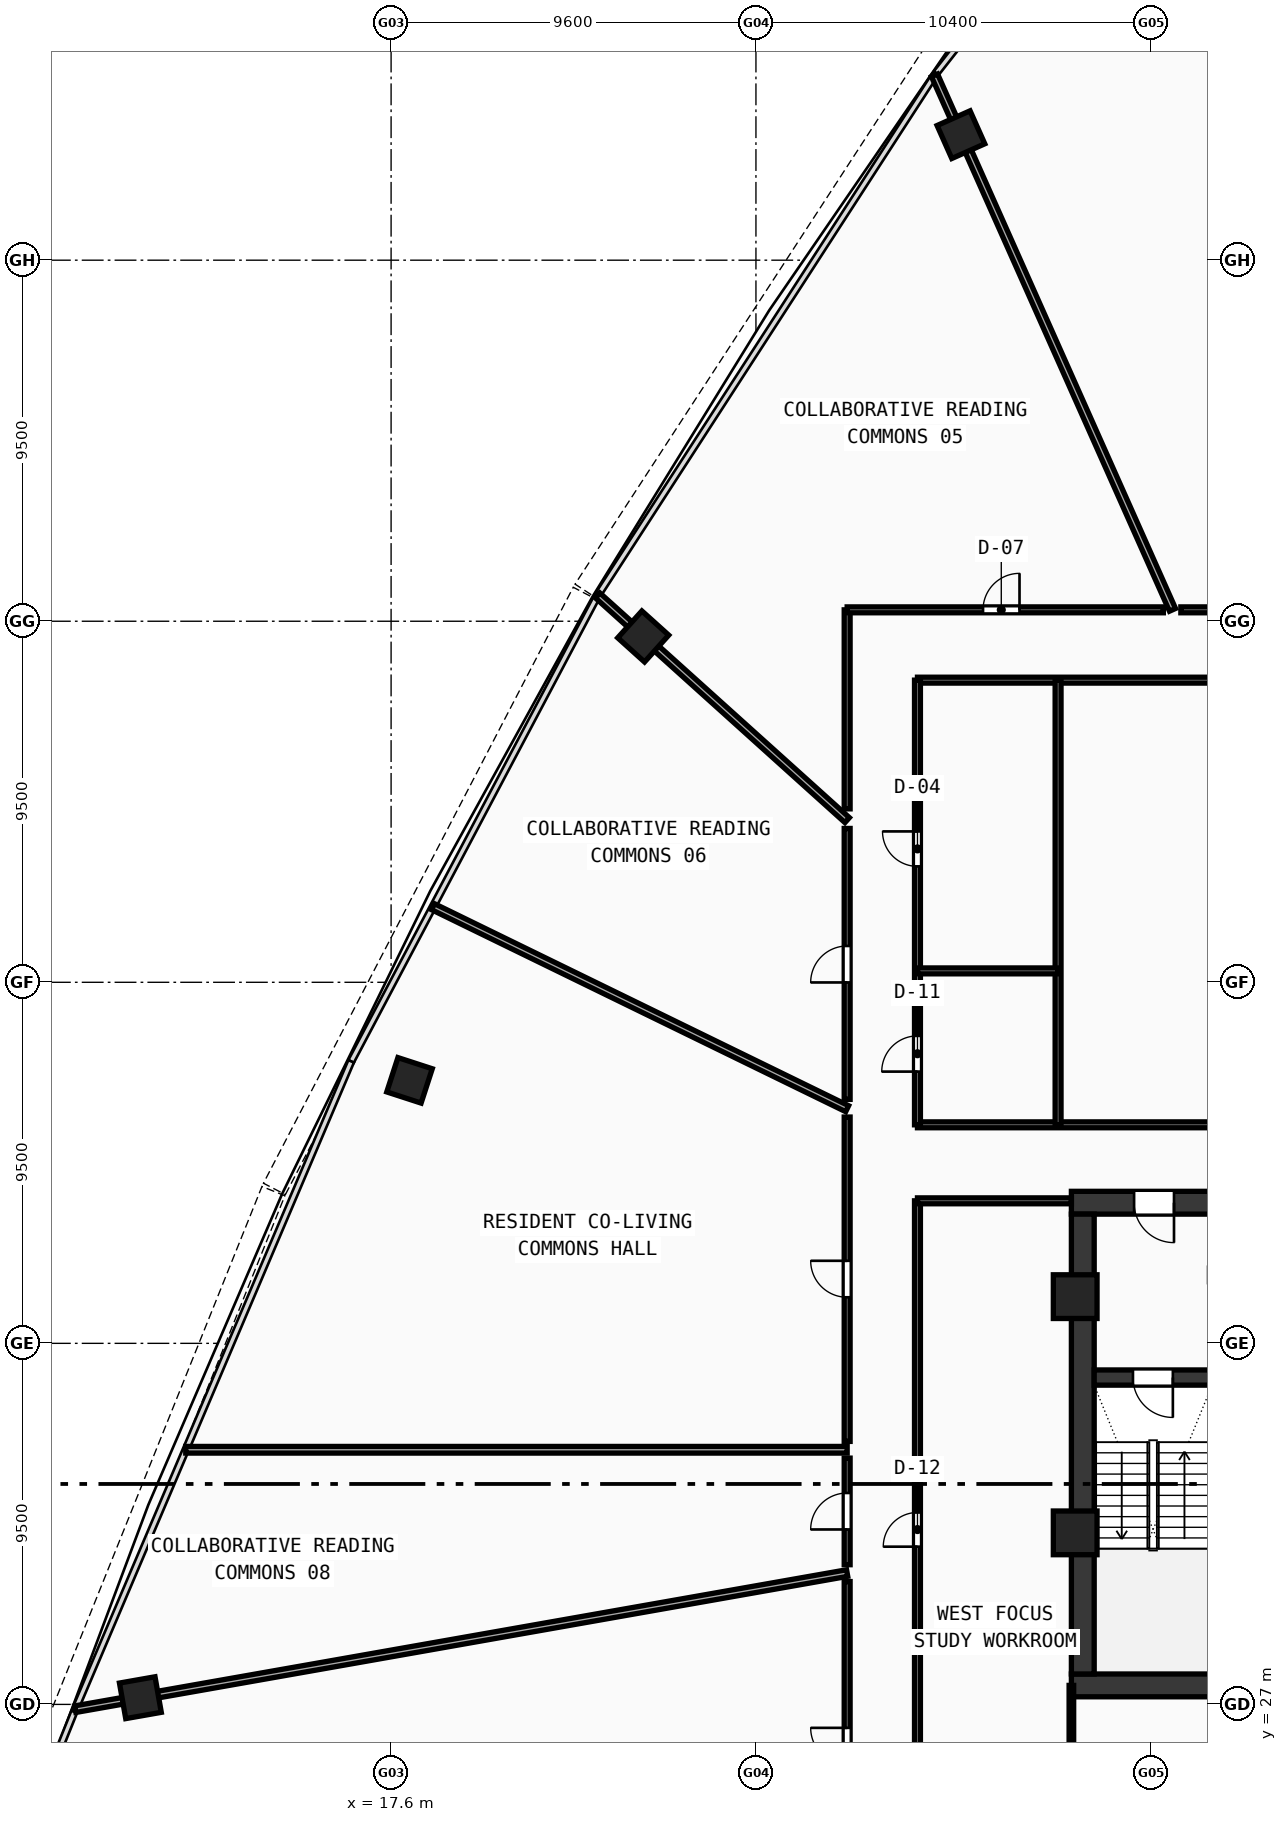
"""IFC4 building model, lengths in metres.
Left out: names, types, materials, properties, quantities, classifications, styles, units other than length and angle.
Written with IfcOpenShell. Run it as: python <this file> out.ifc"""

import sys

from ifc_helpers import new_model, si_unit, direction, frame, frame_2d, origin, origin_with_axes, origin_2d, place, context, subcontext, project, spatial, rectangle, hollow_rectangle, extrude, source, transform, mapped, element, fill, save


model = new_model("IFC4")
c1 = context("Model", 3, precision=1e-05, world=origin(), true_north=direction((0.0, 1.0)))
c2 = subcontext(c1, "Body", "Model", "MODEL_VIEW")
j1 = project(units=[si_unit("LENGTHUNIT", "METRE"), si_unit("PLANEANGLEUNIT", "RADIAN")], contexts=[c1])
p1 = place(None, origin())
s1 = spatial("IfcSite", under=j1, at=p1, CompositionType="ELEMENT")
p2 = place(p1, origin())
s2 = spatial("IfcBuilding", under=s1, at=p2, CompositionType="ELEMENT")
p3 = place(p2, frame((0.0, 0.0, 144.55)))
s3 = spatial("IfcBuildingStorey", under=s2, at=p3, CompositionType="ELEMENT", Elevation=144.55)
p4 = place(p3, frame((35.5, 27.5, 0.0), z_axis=(0.0, 0.0, 1.0), x_axis=(1.0, 0.0, 0.0)))
e1 = element("IfcWall", 1, at=p4, inside=s3, PredefinedType="SHEAR", context=c2, shape_type="SweptSolid", body=[
    extrude(rectangle(XDim=25.0, YDim=0.6, at=frame_2d((12.5, 0.0))), origin(), (0.0, 0.0, 1.0), 3.42),
])
p5 = place(p3, frame((35.5, 40.2, 0.0), z_axis=(0.0, 0.0, 1.0), x_axis=(1.0, 0.0, 0.0)))
e2 = element("IfcWall", 2, at=p5, inside=s3, PredefinedType="SHEAR", context=c2, shape_type="SweptSolid", body=[
    extrude(rectangle(XDim=11.3, YDim=0.6, at=frame_2d((5.65, 0.0))), origin(), (0.0, 0.0, 1.0), 3.42),
])
p6 = place(p5, frame((1.65, 0.0, 0.0)))
e3 = element("IfcOpeningElement", 3, at=p6, cuts=e2, PredefinedType="OPENING", context=c2, shape_type="SweptSolid", body=[
    extrude(rectangle(XDim=1.05, YDim=2.1, at=frame_2d((0.525, 1.05))), frame((0.0, 0.31, 0.0), z_axis=(0.0, -1.0, 0.0), x_axis=(1.0, 0.0, 0.0)), (0.0, 0.0, 1.0), 0.62),
])
p7 = place(p3, frame((35.8, 27.8, 0.0), z_axis=(0.0, 0.0, 1.0), x_axis=(0.0, 1.0, 0.0)))
e4 = element("IfcWall", 4, at=p7, inside=s3, PredefinedType="SHEAR", context=c2, shape_type="SweptSolid", body=[
    extrude(rectangle(XDim=12.1, YDim=0.6, at=frame_2d((6.05, 0.0))), origin(), (0.0, 0.0, 1.0), 3.42),
])
p8 = place(p3, frame((36.1, 35.6, 0.0), z_axis=(0.0, 0.0, 1.0), x_axis=(1.0, 0.0, 0.0)))
e5 = element("IfcWall", 5, at=p8, inside=s3, PredefinedType="SHEAR", context=c2, shape_type="SweptSolid", body=[
    extrude(rectangle(XDim=3.1, YDim=0.4, at=frame_2d((1.55, 0.0))), origin(), (0.0, 0.0, 1.0), 3.42),
])
p9 = place(p8, frame((1.02, 0.0, 0.0)))
e6 = element("IfcOpeningElement", 6, at=p9, cuts=e5, PredefinedType="OPENING", context=c2, shape_type="SweptSolid", body=[
    extrude(rectangle(XDim=1.05, YDim=2.1, at=frame_2d((0.525, 1.05))), frame((0.0, 0.21, 0.0), z_axis=(0.0, -1.0, 0.0), x_axis=(1.0, 0.0, 0.0)), (0.0, 0.0, 1.0), 0.42),
])
m1 = source(origin(), c2, "Body", "SweptSolid", [
    extrude(hollow_rectangle(XDim=1.15, YDim=1.15, WallThickness=0.048, at=origin_2d()), origin(), (0.0, 0.0, 1.0), 3.68),
])
for number, where, z_axis, x_axis in (
    (7, (35.6, 37.729, -0.26), (0.0, 0.0, 1.0), (1.0, 0.0, 0.0)),
    (8, (35.6, 31.513, -0.26), (0.0, 0.0, 1.0), (1.0, 0.0, 0.0)),
):
    element("IfcColumn", number, at=place(p3, frame(where, z_axis=z_axis, x_axis=x_axis)), inside=s3, PredefinedType="COLUMN", context=c2, shape_type="MappedRepresentation", body=[
        mapped(m1, transform((0.0, 0.0, 0.0), scale=1.0)),
    ])
m2 = source(origin(), c2, "Body", "SweptSolid", [
    extrude(hollow_rectangle(XDim=0.95, YDim=0.95, WallThickness=0.04, at=origin_2d()), origin(), (0.0, 0.0, 1.0), 3.68),
])
for number, where, z_axis, x_axis in (
    (9, (32.594, 68.303, -0.26), (0.0, 0.0, 1.0), (-0.914, -0.407, 0.0)),
    (10, (24.234, 55.099, -0.26), (0.0, 0.0, 1.0), (-0.669, -0.743, 0.0)),
    (11, (18.085, 43.42, -0.26), (0.0, 0.0, 1.0), (-0.309, -0.951, 0.0)),
    (12, (11.003, 27.177, -0.26), (0.0, 0.0, 1.0), (0.174, -0.985, 0.0)),
):
    element("IfcColumn", number, at=place(p3, frame(where, z_axis=z_axis, x_axis=x_axis)), inside=s3, PredefinedType="COLUMN", context=c2, shape_type="MappedRepresentation", body=[
        mapped(m2, transform((0.0, 0.0, 0.0), scale=1.0)),
    ])
p10 = place(p3, frame((31.45, 42.25, 0.0), z_axis=(0.0, 0.0, 1.0), x_axis=(1.0, 0.0, 0.0)))
e13 = element("IfcWall", 13, at=p10, inside=s3, PredefinedType="PARTITIONING", context=c2, shape_type="SweptSolid", body=[
    extrude(rectangle(XDim=33.1, YDim=0.155, at=frame_2d((16.55, 0.0))), origin(), (0.0, 0.0, 1.0), 2.77),
])
p11 = place(p3, frame((31.45, 53.95, 0.0), z_axis=(0.0, 0.0, 1.0), x_axis=(1.0, 0.0, 0.0)))
e14 = element("IfcWall", 14, at=p11, inside=s3, PredefinedType="PARTITIONING", context=c2, shape_type="SweptSolid", body=[
    extrude(rectangle(XDim=33.1, YDim=0.155, at=frame_2d((16.55, 0.0))), origin(), (0.0, 0.0, 1.0), 2.77),
])
p12 = place(p11, frame((8.0, 0.0, 0.0)))
e15 = element("IfcOpeningElement", 15, at=p12, cuts=e14, PredefinedType="OPENING", context=c2, shape_type="SweptSolid", body=[
    extrude(rectangle(XDim=0.92, YDim=2.1, at=frame_2d((0.46, 1.05))), frame((0.0, 0.087, 0.0), z_axis=(0.0, -1.0, 0.0), x_axis=(1.0, 0.0, 0.0)), (0.0, 0.0, 1.0), 0.175),
])
p13 = place(p11, frame((25.05, 0.0, 0.0)))
e16 = element("IfcOpeningElement", 16, at=p13, cuts=e14, PredefinedType="OPENING", context=c2, shape_type="SweptSolid", body=[
    extrude(rectangle(XDim=0.92, YDim=2.1, at=frame_2d((0.46, 1.05))), frame((0.0, 0.087, 0.0), z_axis=(0.0, -1.0, 0.0), x_axis=(1.0, 0.0, 0.0)), (0.0, 0.0, 1.0), 0.175),
])
p14 = place(p3, frame((31.45, 42.25, 0.0), z_axis=(0.0, 0.0, 1.0), x_axis=(0.0, 1.0, 0.0)))
e17 = element("IfcWall", 17, at=p14, inside=s3, PredefinedType="PARTITIONING", context=c2, shape_type="SweptSolid", body=[
    extrude(rectangle(XDim=11.7, YDim=0.155, at=frame_2d((5.85, 0.0))), origin(), (0.0, 0.0, 1.0), 2.77),
])
p15 = place(p14, frame((1.4, 0.0, 0.0)))
e18 = element("IfcOpeningElement", 18, at=p15, cuts=e17, PredefinedType="OPENING", context=c2, shape_type="SweptSolid", body=[
    extrude(rectangle(XDim=0.94, YDim=2.1, at=frame_2d((0.47, 1.05))), frame((0.0, 0.087, 0.0), z_axis=(0.0, -1.0, 0.0), x_axis=(1.0, 0.0, 0.0)), (0.0, 0.0, 1.0), 0.175),
])
p16 = place(p14, frame((6.8, 0.0, 0.0)))
e19 = element("IfcOpeningElement", 19, at=p16, cuts=e17, PredefinedType="OPENING", context=c2, shape_type="SweptSolid", body=[
    extrude(rectangle(XDim=0.92, YDim=2.1, at=frame_2d((0.46, 1.05))), frame((0.0, 0.087, 0.0), z_axis=(0.0, -1.0, 0.0), x_axis=(1.0, 0.0, 0.0)), (0.0, 0.0, 1.0), 0.175),
])
p17 = place(p3, frame((35.15, 42.25, 0.0), z_axis=(0.0, 0.0, 1.0), x_axis=(0.0, 1.0, 0.0)))
e20 = element("IfcWall", 20, at=p17, inside=s3, PredefinedType="PARTITIONING", context=c2, shape_type="SweptSolid", body=[
    extrude(rectangle(XDim=11.7, YDim=0.155, at=frame_2d((5.85, 0.0))), origin(), (0.0, 0.0, 1.0), 2.77),
])
p18 = place(p3, frame((31.45, 46.3, 0.0), z_axis=(0.0, 0.0, 1.0), x_axis=(1.0, 0.0, 0.0)))
e21 = element("IfcWall", 21, at=p18, inside=s3, PredefinedType="PARTITIONING", context=c2, shape_type="SweptSolid", body=[
    extrude(rectangle(XDim=3.7, YDim=0.155, at=frame_2d((1.85, 0.0))), origin(), (0.0, 0.0, 1.0), 2.77),
])
p19 = place(p3, frame((31.45, 23.65, 0.0), z_axis=(0.0, 0.0, 1.0), x_axis=(0.0, 1.0, 0.0)))
e22 = element("IfcWall", 22, at=p19, inside=s3, PredefinedType="PARTITIONING", context=c2, shape_type="SweptSolid", body=[
    extrude(rectangle(XDim=16.6, YDim=0.155, at=frame_2d((8.3, 0.0))), origin(), (0.0, 0.0, 1.0), 2.77),
])
p20 = place(p19, frame((7.5, 0.0, 0.0)))
e23 = element("IfcOpeningElement", 23, at=p20, cuts=e22, PredefinedType="OPENING", context=c2, shape_type="SweptSolid", body=[
    extrude(rectangle(XDim=0.9, YDim=2.08, at=frame_2d((0.45, 1.04))), frame((0.0, 0.087, 0.0), z_axis=(0.0, -1.0, 0.0), x_axis=(1.0, 0.0, 0.0)), (0.0, 0.0, 1.0), 0.175),
])
p21 = place(p3, frame((31.45, 40.25, 0.0), z_axis=(0.0, 0.0, 1.0), x_axis=(1.0, 0.0, 0.0)))
e24 = element("IfcWall", 24, at=p21, inside=s3, PredefinedType="PARTITIONING", context=c2, shape_type="SweptSolid", body=[
    extrude(rectangle(XDim=4.05, YDim=0.155, at=frame_2d((2.025, 0.0))), origin(), (0.0, 0.0, 1.0), 3.42),
])
p22 = place(p3, frame((35.5, 23.65, 0.0), z_axis=(0.0, 0.0, 1.0), x_axis=(0.0, 1.0, 0.0)))
e25 = element("IfcWall", 25, at=p22, inside=s3, PredefinedType="PARTITIONING", context=c2, shape_type="SweptSolid", body=[
    extrude(rectangle(XDim=3.85, YDim=0.12, at=frame_2d((1.925, 0.0))), origin(), (0.0, 0.0, 1.0), 3.02),
])
p23 = place(p3, frame((38.16, 55.8, 0.0), z_axis=(0.0, 0.0, 1.0), x_axis=(-0.406735812773, 0.913545827317, 0.0)))
e26 = element("IfcWall", 26, at=p23, inside=s3, PredefinedType="PARTITIONING", context=c2, shape_type="SweptSolid", body=[
    extrude(rectangle(XDim=15.394, YDim=0.175, at=frame_2d((7.697, 0.0))), origin(), (0.0, 0.0, 1.0), 2.77),
])
p24 = place(p3, frame((29.6, 50.267, 0.0), z_axis=(0.0, 0.0, 1.0), x_axis=(-0.743144335498, 0.669131150535, 0.0)))
e27 = element("IfcWall", 27, at=p24, inside=s3, PredefinedType="PARTITIONING", context=c2, shape_type="SweptSolid", body=[
    extrude(rectangle(XDim=8.834, YDim=0.175, at=frame_2d((4.417, 0.0))), origin(), (0.0, 0.0, 1.0), 2.77),
])
p25 = place(p3, frame((29.6, 42.674, 0.0), z_axis=(0.0, 0.0, 1.0), x_axis=(-0.898797277455, 0.438364521875, 0.0)))
e28 = element("IfcWall", 28, at=p25, inside=s3, PredefinedType="PARTITIONING", context=c2, shape_type="SweptSolid", body=[
    extrude(rectangle(XDim=12.125, YDim=0.175, at=frame_2d((6.062, 0.0))), origin(), (0.0, 0.0, 1.0), 2.77),
])
p26 = place(p3, frame((29.6, 33.7, 0.0), z_axis=(0.0, 0.0, 1.0), x_axis=(-1.0, 0.0, 0.0)))
e29 = element("IfcWall", 29, at=p26, inside=s3, PredefinedType="PARTITIONING", context=c2, shape_type="SweptSolid", body=[
    extrude(rectangle(XDim=17.403, YDim=0.175, at=frame_2d((8.702, 0.0))), origin(), (0.0, 0.0, 1.0), 2.77),
])
p27 = place(p3, frame((29.6, 30.456, 0.0), z_axis=(0.0, 0.0, 1.0), x_axis=(-0.984807623882, -0.173648909998, 0.0)))
e30 = element("IfcWall", 30, at=p27, inside=s3, PredefinedType="PARTITIONING", context=c2, shape_type="SweptSolid", body=[
    extrude(rectangle(XDim=20.622, YDim=0.175, at=frame_2d((10.311, 0.0))), origin(), (0.0, 0.0, 1.0), 2.77),
])
p28 = place(p3, frame((29.6, 21.8, 0.0), z_axis=(0.0, 0.0, 1.0), x_axis=(0.0, 1.0, 0.0)))
e31 = element("IfcWall", 31, at=p28, inside=s3, PredefinedType="PARTITIONING", context=c2, shape_type="SweptSolid", body=[
    extrude(rectangle(XDim=8.432, YDim=0.155, at=frame_2d((4.216, 0.0))), origin(), (0.0, 0.0, 1.0), 3.02),
])
p29 = place(p28, frame((3.623, 0.0, 0.0)))
e32 = element("IfcOpeningElement", 32, at=p29, cuts=e31, PredefinedType="OPENING", context=c2, shape_type="SweptSolid", body=[
    extrude(rectangle(XDim=0.96, YDim=2.12, at=frame_2d((0.48, 1.06))), frame((0.0, 0.087, 0.0), z_axis=(0.0, -1.0, 0.0), x_axis=(1.0, 0.0, 0.0)), (0.0, 0.0, 1.0), 0.175),
])
p30 = place(p3, frame((29.6, 30.675, 0.0), z_axis=(0.0, 0.0, 1.0), x_axis=(0.0, 1.0, 0.0)))
e33 = element("IfcWall", 33, at=p30, inside=s3, PredefinedType="PARTITIONING", context=c2, shape_type="SweptSolid", body=[
    extrude(rectangle(XDim=2.805, YDim=0.155, at=frame_2d((1.402, 0.0))), origin(), (0.0, 0.0, 1.0), 3.42),
])
p31 = place(p30, frame((0.927, 0.0, 0.0)))
e34 = element("IfcOpeningElement", 34, at=p31, cuts=e33, PredefinedType="OPENING", context=c2, shape_type="SweptSolid", body=[
    extrude(rectangle(XDim=0.96, YDim=2.12, at=frame_2d((0.48, 1.06))), frame((0.0, 0.087, 0.0), z_axis=(0.0, -1.0, 0.0), x_axis=(1.0, 0.0, 0.0)), (0.0, 0.0, 1.0), 0.175),
])
p32 = place(p3, frame((29.6, 33.92, 0.0), z_axis=(0.0, 0.0, 1.0), x_axis=(0.0, 1.0, 0.0)))
e35 = element("IfcWall", 35, at=p32, inside=s3, PredefinedType="PARTITIONING", context=c2, shape_type="SweptSolid", body=[
    extrude(rectangle(XDim=8.535, YDim=0.155, at=frame_2d((4.267, 0.0))), origin(), (0.0, 0.0, 1.0), 2.77),
])
p33 = place(p32, frame((3.792, 0.0, 0.0)))
e36 = element("IfcOpeningElement", 36, at=p33, cuts=e35, PredefinedType="OPENING", context=c2, shape_type="SweptSolid", body=[
    extrude(rectangle(XDim=0.96, YDim=2.12, at=frame_2d((0.48, 1.06))), frame((0.0, 0.087, 0.0), z_axis=(0.0, -1.0, 0.0), x_axis=(1.0, 0.0, 0.0)), (0.0, 0.0, 1.0), 0.175),
])
p34 = place(p3, frame((29.6, 42.919, 0.0), z_axis=(0.0, 0.0, 1.0), x_axis=(0.0, 1.0, 0.0)))
e37 = element("IfcWall", 37, at=p34, inside=s3, PredefinedType="PARTITIONING", context=c2, shape_type="SweptSolid", body=[
    extrude(rectangle(XDim=7.128, YDim=0.155, at=frame_2d((3.564, 0.0))), origin(), (0.0, 0.0, 1.0), 2.77),
])
p35 = place(p34, frame((3.077, 0.0, 0.0)))
e38 = element("IfcOpeningElement", 38, at=p35, cuts=e37, PredefinedType="OPENING", context=c2, shape_type="SweptSolid", body=[
    extrude(rectangle(XDim=0.96, YDim=2.12, at=frame_2d((0.48, 1.06))), frame((0.0, 0.087, 0.0), z_axis=(0.0, -1.0, 0.0), x_axis=(1.0, 0.0, 0.0)), (0.0, 0.0, 1.0), 0.175),
])
p36 = place(p3, frame((29.6, 50.563, 0.0), z_axis=(0.0, 0.0, 1.0), x_axis=(0.0, 1.0, 0.0)))
e39 = element("IfcWall", 39, at=p36, inside=s3, PredefinedType="PARTITIONING", context=c2, shape_type="SweptSolid", body=[
    extrude(rectangle(XDim=5.237, YDim=0.155, at=frame_2d((2.618, 0.0))), origin(), (0.0, 0.0, 1.0), 3.02),
])
p37 = place(p3, frame((29.6, 55.8, 0.0), z_axis=(0.0, 0.0, 1.0), x_axis=(1.0, 0.0, 0.0)))
e40 = element("IfcWall", 40, at=p37, inside=s3, PredefinedType="PARTITIONING", context=c2, shape_type="SweptSolid", body=[
    extrude(rectangle(XDim=8.32, YDim=0.155, at=frame_2d((4.16, 0.0))), origin(), (0.0, 0.0, 1.0), 3.02),
])
p38 = place(p37, frame((3.575, 0.0, 0.0)))
e41 = element("IfcOpeningElement", 41, at=p38, cuts=e40, PredefinedType="OPENING", context=c2, shape_type="SweptSolid", body=[
    extrude(rectangle(XDim=0.96, YDim=2.12, at=frame_2d((0.48, 1.06))), frame((0.0, 0.087, 0.0), z_axis=(0.0, -1.0, 0.0), x_axis=(1.0, 0.0, 0.0)), (0.0, 0.0, 1.0), 0.175),
])
p39 = place(p3, frame((38.38, 55.8, 0.0), z_axis=(0.0, 0.0, 1.0), x_axis=(1.0, 0.0, 0.0)))
e42 = element("IfcWall", 42, at=p39, inside=s3, PredefinedType="PARTITIONING", context=c2, shape_type="SweptSolid", body=[
    extrude(rectangle(XDim=5.329, YDim=0.155, at=frame_2d((2.665, 0.0))), origin(), (0.0, 0.0, 1.0), 2.77),
])
p40 = place(p39, frame((2.115, 0.0, 0.0)))
e43 = element("IfcOpeningElement", 43, at=p40, cuts=e42, PredefinedType="OPENING", context=c2, shape_type="SweptSolid", body=[
    extrude(rectangle(XDim=0.96, YDim=2.12, at=frame_2d((0.48, 1.06))), frame((0.0, 0.087, 0.0), z_axis=(0.0, -1.0, 0.0), x_axis=(1.0, 0.0, 0.0)), (0.0, 0.0, 1.0), 0.175),
])
m3 = source(origin(), c2, "Body", "SweptSolid", [
    extrude(rectangle(XDim=1.05, YDim=2.1, at=frame_2d((0.525, 1.05))), frame((0.0, 0.025, 0.0), z_axis=(0.0, -1.0, 0.0), x_axis=(1.0, 0.0, 0.0)), (0.0, 0.0, 1.0), 0.05),
])
p41 = place(p9, frame((1.05, 0.0, 0.0), z_axis=(0.0, 0.0, 1.0), x_axis=(-1.0, 0.0, 0.0)))
e44 = element("IfcDoor", 44, at=p41, inside=s3, OperationType="SINGLE_SWING_LEFT", PredefinedType="DOOR", context=c2, shape_type="MappedRepresentation", body=[
    mapped(m3, transform((0.0, 0.0, 0.0), scale=1.0)),
])
fill(e6, e44)
p42 = place(p6, frame((1.05, 0.0, 0.0), z_axis=(0.0, 0.0, 1.0), x_axis=(-1.0, 0.0, 0.0)))
e45 = element("IfcDoor", 45, at=p42, inside=s3, OperationType="SINGLE_SWING_LEFT", PredefinedType="DOOR", context=c2, shape_type="MappedRepresentation", body=[
    mapped(m3, transform((0.0, 0.0, 0.0), scale=1.0)),
])
fill(e3, e45)
m4 = source(origin(), c2, "Body", "SweptSolid", [
    extrude(rectangle(XDim=0.94, YDim=2.1, at=frame_2d((0.47, 1.05))), frame((0.0, 0.025, 0.0), z_axis=(0.0, -1.0, 0.0), x_axis=(1.0, 0.0, 0.0)), (0.0, 0.0, 1.0), 0.05),
])
p43 = place(p15, origin_with_axes())
e46 = element("IfcDoor", 46, at=p43, inside=s3, OperationType="SINGLE_SWING_LEFT", PredefinedType="DOOR", context=c2, shape_type="MappedRepresentation", body=[
    mapped(m4, transform((0.0, 0.0, 0.0), scale=1.0)),
])
fill(e18, e46)
m5 = source(origin(), c2, "Body", "SweptSolid", [
    extrude(rectangle(XDim=0.92, YDim=2.1, at=frame_2d((0.46, 1.05))), frame((0.0, 0.025, 0.0), z_axis=(0.0, -1.0, 0.0), x_axis=(1.0, 0.0, 0.0)), (0.0, 0.0, 1.0), 0.05),
])
p44 = place(p16, origin_with_axes())
e47 = element("IfcDoor", 47, at=p44, inside=s3, OperationType="SINGLE_SWING_RIGHT", PredefinedType="DOOR", context=c2, shape_type="MappedRepresentation", body=[
    mapped(m5, transform((0.0, 0.0, 0.0), scale=1.0)),
])
fill(e19, e47)
m6 = source(origin(), c2, "Body", "SweptSolid", [
    extrude(rectangle(XDim=0.9, YDim=2.08, at=frame_2d((0.45, 1.04))), frame((0.0, 0.025, 0.0), z_axis=(0.0, -1.0, 0.0), x_axis=(1.0, 0.0, 0.0)), (0.0, 0.0, 1.0), 0.05),
])
p45 = place(p20, origin_with_axes())
e48 = element("IfcDoor", 48, at=p45, inside=s3, OperationType="SINGLE_SWING_LEFT", PredefinedType="DOOR", context=c2, shape_type="MappedRepresentation", body=[
    mapped(m6, transform((0.0, 0.0, 0.0), scale=1.0)),
])
fill(e23, e48)
m7 = source(origin(), c2, "Body", "SweptSolid", [
    extrude(rectangle(XDim=0.96, YDim=2.12, at=frame_2d((0.48, 1.06))), frame((0.0, 0.025, 0.0), z_axis=(0.0, -1.0, 0.0), x_axis=(1.0, 0.0, 0.0)), (0.0, 0.0, 1.0), 0.05),
])
p46 = place(p38, origin_with_axes())
e49 = element("IfcDoor", 49, at=p46, inside=s3, OperationType="SINGLE_SWING_RIGHT", PredefinedType="DOOR", context=c2, shape_type="MappedRepresentation", body=[
    mapped(m7, transform((0.0, 0.0, 0.0), scale=1.0)),
])
fill(e41, e49)
p47 = place(p35, origin_with_axes())
e50 = element("IfcDoor", 50, at=p47, inside=s3, OperationType="SINGLE_SWING_LEFT", PredefinedType="DOOR", context=c2, shape_type="MappedRepresentation", body=[
    mapped(m7, transform((0.0, 0.0, 0.0), scale=1.0)),
])
fill(e38, e50)
p48 = place(p33, origin_with_axes())
e51 = element("IfcDoor", 51, at=p48, inside=s3, OperationType="SINGLE_SWING_RIGHT", PredefinedType="DOOR", context=c2, shape_type="MappedRepresentation", body=[
    mapped(m7, transform((0.0, 0.0, 0.0), scale=1.0)),
])
fill(e36, e51)
p49 = place(p31, origin_with_axes())
e52 = element("IfcDoor", 52, at=p49, inside=s3, OperationType="SINGLE_SWING_LEFT", PredefinedType="DOOR", context=c2, shape_type="MappedRepresentation", body=[
    mapped(m7, transform((0.0, 0.0, 0.0), scale=1.0)),
])
fill(e34, e52)
p50 = place(p29, origin_with_axes())
e53 = element("IfcDoor", 53, at=p50, inside=s3, OperationType="SINGLE_SWING_RIGHT", PredefinedType="DOOR", context=c2, shape_type="MappedRepresentation", body=[
    mapped(m7, transform((0.0, 0.0, 0.0), scale=1.0)),
])
fill(e32, e53)
save(model, sys.argv[1])
